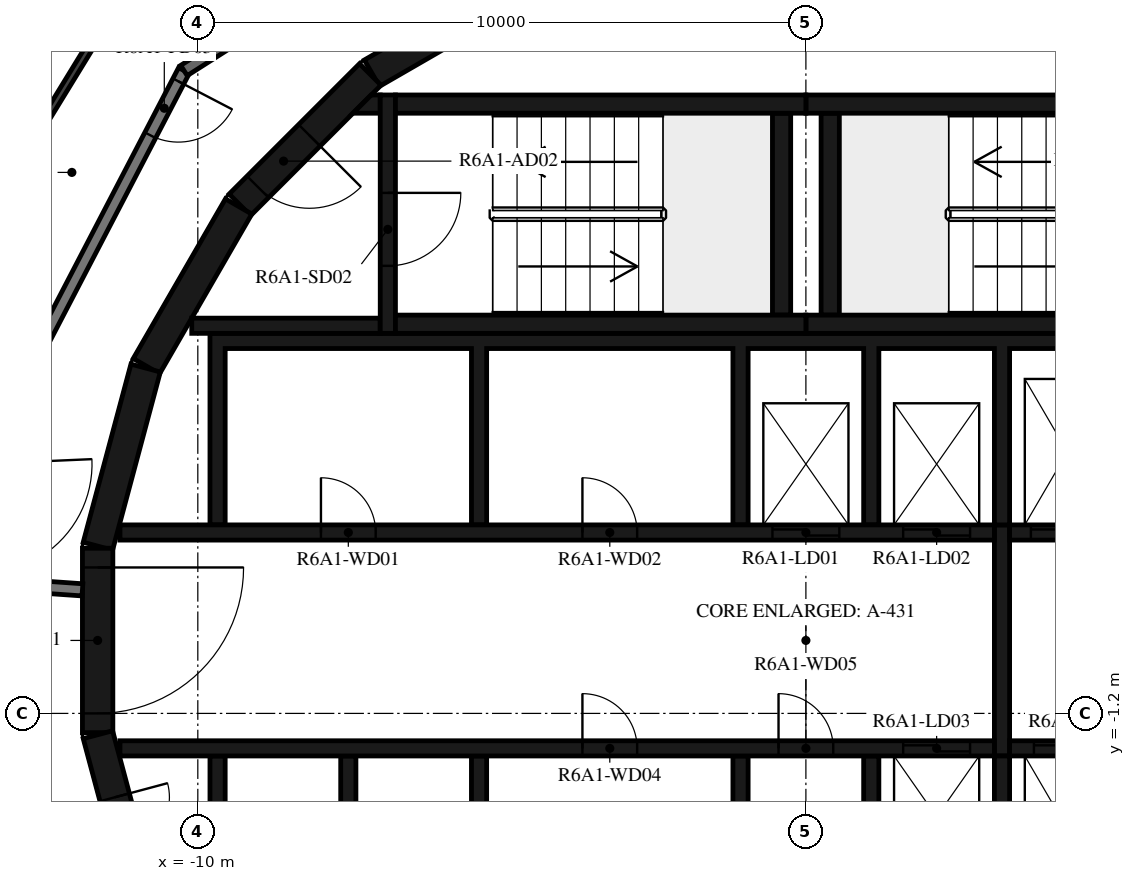
"""IFC4 building model, lengths in metres.
Left out: names, types, materials, properties, quantities, classifications, styles, units other than length and angle.
Written with IfcOpenShell. Run it as: python <this file> out.ifc"""

import sys

from ifc_helpers import new_model, si_unit, direction, frame, frame_2d, origin, place, context, subcontext, project, spatial, polyline, rectangle, outline, extrude, element, fill, save


model = new_model("IFC4")
c1 = context("Model", 3, precision=1e-05, world=origin(), true_north=direction((0.0, 1.0)))
c2 = subcontext(c1, "Body", "Model", "MODEL_VIEW")
j1 = project(units=[si_unit("LENGTHUNIT", "METRE"), si_unit("PLANEANGLEUNIT", "RADIAN")], contexts=[c1])
p1 = place(None, origin())
s1 = spatial("IfcSite", under=j1, at=p1, CompositionType="ELEMENT")
p2 = place(p1, origin())
s2 = spatial("IfcBuilding", under=s1, at=p2, CompositionType="ELEMENT")
p3 = place(p2, frame((0.0, 0.0, 230.2)))
s3 = spatial("IfcBuildingStorey", under=s2, at=p3, CompositionType="ELEMENT", Elevation=230.2)
p4 = place(p3, frame((-4.51, 10.845, 0.0), z_axis=(0.0, 0.0, 1.0), x_axis=(-0.865975092491, -0.500087131594, 0.0)))
e1 = element("IfcWall", 1, at=p4, inside=s3, PredefinedType="SHEAR", context=c2, shape_type="SweptSolid", body=[
    extrude(rectangle(XDim=3.033, YDim=0.5, at=frame_2d((1.516, 0.0))), origin(), (0.0, 0.0, 1.0), 3.12),
])
p5 = place(p3, frame((-7.164, 9.308, 0.0), z_axis=(0.0, 0.0, 1.0), x_axis=(-0.707106781187, -0.707106781187, 0.0)))
e2 = element("IfcWall", 2, at=p5, inside=s3, PredefinedType="SHEAR", context=c2, shape_type="SweptSolid", body=[
    extrude(rectangle(XDim=3.032, YDim=0.5, at=frame_2d((1.516, 0.0))), origin(), (0.0, 0.0, 1.0), 3.12),
])
p6 = place(p5, frame((1.416, 0.0, 0.0)))
e3 = element("IfcOpeningElement", 3, at=p6, cuts=e2, PredefinedType="OPENING", context=c2, shape_type="SweptSolid", body=[
    extrude(rectangle(XDim=1.2, YDim=2.1, at=frame_2d((0.6, 1.05))), frame((0.0, 0.26, 0.0), z_axis=(0.0, -1.0, 0.0), x_axis=(1.0, 0.0, 0.0)), (0.0, 0.0, 1.0), 0.52),
])
for number, where, z_axis, x_axis in (
    (4, (-9.329, 7.137, 0.0), (0.0, 0.0, 1.0), (-0.5, -0.866, 0.0)),
    (5, (-10.858, 4.479, 0.0), (0.0, 0.0, 1.0), (-0.259, -0.966, 0.0)),
):
    element("IfcWall", number, at=place(p3, frame(where, z_axis=z_axis, x_axis=x_axis)), inside=s3, PredefinedType="SHEAR", context=c2, shape_type="SweptSolid", body=[
        extrude(rectangle(XDim=3.033, YDim=0.5, at=frame_2d((1.516, 0.0))), origin(), (0.0, 0.0, 1.0), 3.12),
    ])
p7 = place(p3, frame((-11.647, 1.516, 0.0), z_axis=(0.0, 0.0, 1.0), x_axis=(0.0, -1.0, 0.0)))
e6 = element("IfcWall", 6, at=p7, inside=s3, PredefinedType="SHEAR", context=c2, shape_type="SweptSolid", body=[
    extrude(rectangle(XDim=3.033, YDim=0.5, at=frame_2d((1.516, 0.0))), origin(), (0.0, 0.0, 1.0), 3.12),
])
p8 = place(p7, frame((0.316, 0.0, 0.0)))
e7 = element("IfcOpeningElement", 7, at=p8, cuts=e6, PredefinedType="OPENING", context=c2, shape_type="SweptSolid", body=[
    extrude(rectangle(XDim=2.4, YDim=2.1, at=frame_2d((1.2, 1.05))), frame((0.0, 0.26, 0.0), z_axis=(0.0, -1.0, 0.0), x_axis=(1.0, 0.0, 0.0)), (0.0, 0.0, 1.0), 0.52),
])
p9 = place(p3, frame((-11.643, -1.55, 0.0), z_axis=(0.0, 0.0, 1.0), x_axis=(0.258734743916, -0.965948410781, 0.0)))
e8 = element("IfcWall", 8, at=p9, inside=s3, PredefinedType="SHEAR", context=c2, shape_type="SweptSolid", body=[
    extrude(rectangle(XDim=3.033, YDim=0.5, at=frame_2d((1.516, 0.0))), origin(), (0.0, 0.0, 1.0), 3.12),
])
p10 = place(p9, frame((1.066, 0.0, 0.0)))
e9 = element("IfcOpeningElement", 9, at=p10, cuts=e8, PredefinedType="OPENING", context=c2, shape_type="SweptSolid", body=[
    extrude(rectangle(XDim=0.9, YDim=2.1, at=frame_2d((0.45, 1.05))), frame((0.0, 0.26, 0.0), z_axis=(0.0, -1.0, 0.0), x_axis=(1.0, 0.0, 0.0)), (0.0, 0.0, 1.0), 0.52),
])
for number, where, z_axis, x_axis in (
    (10, (0.0, 5.2, 0.0), (0.0, 0.0, 1.0), (1.0, 0.0, 0.0)),
    (11, (0.0, 8.82, 0.0), (0.0, 0.0, 1.0), (1.0, 0.0, 0.0)),
):
    element("IfcWall", number, at=place(p3, frame(where, z_axis=z_axis, x_axis=x_axis)), inside=s3, PredefinedType="SHEAR", context=c2, shape_type="SweptSolid", body=[
        extrude(rectangle(XDim=6.75, YDim=0.3, at=frame_2d((3.375, 0.0))), origin(), (0.0, 0.0, 1.0), 3.12),
    ])
p11 = place(p3, frame((0.4, 5.35, 0.0), z_axis=(0.0, 0.0, 1.0), x_axis=(0.0, 1.0, 0.0)))
e12 = element("IfcWall", 12, at=p11, inside=s3, PredefinedType="SHEAR", context=c2, shape_type="SweptSolid", body=[
    extrude(rectangle(XDim=3.32, YDim=0.3, at=frame_2d((1.66, 0.0))), origin(), (0.0, 0.0, 1.0), 3.12),
])
for number, where, z_axis, x_axis in (
    (13, (-6.75, 5.2, 0.0), (0.0, 0.0, 1.0), (1.0, 0.0, 0.0)),
    (14, (-6.75, 8.82, 0.0), (0.0, 0.0, 1.0), (1.0, 0.0, 0.0)),
):
    element("IfcWall", number, at=place(p3, frame(where, z_axis=z_axis, x_axis=x_axis)), inside=s3, PredefinedType="SHEAR", context=c2, shape_type="SweptSolid", body=[
        extrude(rectangle(XDim=6.75, YDim=0.3, at=frame_2d((3.375, 0.0))), origin(), (0.0, 0.0, 1.0), 3.12),
    ])
p12 = place(p3, frame((-0.4, 5.35, 0.0), z_axis=(0.0, 0.0, 1.0), x_axis=(0.0, 1.0, 0.0)))
e15 = element("IfcWall", 15, at=p12, inside=s3, PredefinedType="SHEAR", context=c2, shape_type="SweptSolid", body=[
    extrude(rectangle(XDim=3.32, YDim=0.3, at=frame_2d((1.66, 0.0))), origin(), (0.0, 0.0, 1.0), 3.12),
])
p13 = place(p3, frame((-6.875, 8.97, 0.0), z_axis=(0.0, 0.0, 1.0), x_axis=(0.0, -1.0, 0.0)))
e16 = element("IfcWall", 16, at=p13, inside=s3, PredefinedType="SHEAR", context=c2, shape_type="SweptSolid", body=[
    extrude(rectangle(XDim=3.92, YDim=0.25, at=frame_2d((1.96, 0.0))), origin(), (0.0, 0.0, 1.0), 3.12),
])
p14 = place(p13, frame((1.61, 0.0, 0.0)))
e17 = element("IfcOpeningElement", 17, at=p14, cuts=e16, PredefinedType="OPENING", context=c2, shape_type="SweptSolid", body=[
    extrude(rectangle(XDim=1.2, YDim=2.1, at=frame_2d((0.6, 1.05))), frame((0.0, 0.135, 0.0), z_axis=(0.0, -1.0, 0.0), x_axis=(1.0, 0.0, 0.0)), (0.0, 0.0, 1.0), 0.27),
])
p15 = place(p3, frame((-7.0, 5.175, 0.0), z_axis=(0.0, 0.0, 1.0), x_axis=(-1.0, 0.0, 0.0)))
e18 = element("IfcWall", 18, at=p15, inside=s3, PredefinedType="SHEAR", context=c2, shape_type="SweptSolid", body=[
    extrude(rectangle(XDim=3.1, YDim=0.25, at=frame_2d((1.55, 0.0))), origin(), (0.0, 0.0, 1.0), 3.12),
])
p16 = place(p3, origin())
e19 = element("IfcWall", 19, at=p16, inside=s3, PredefinedType="SHEAR", context=c2, shape_type="SweptSolid", body=[
    extrude(outline(polyline([(-7.148, 8.97), (-7.0, 8.97), (-7.0, 8.67), (-7.448, 8.67), (-7.148, 8.97)])), origin(), (0.0, 0.0, 1.0), 3.12),
])
p17 = place(p3, origin())
e20 = element("IfcWall", 20, at=p17, inside=s3, PredefinedType="SHEAR", context=c2, shape_type="SweptSolid", body=[
    extrude(outline(polyline([(-9.55, 4.8), (-5.5, 4.8), (-5.5, 1.9), (-5.25, 1.9), (-5.25, 4.8), (-1.2, 4.8), (-1.2, 1.9), (-0.95, 1.9), (-0.95, 4.8), (0.95, 4.8), (0.95, 1.9), (1.2, 1.9), (1.2, 4.8), (3.1, 4.8), (3.1, 1.9), (3.35, 1.9), (3.35, 4.8), (5.25, 4.8), (5.25, 1.9), (5.5, 1.9), (5.5, 4.8), (7.4, 4.8), (7.4, 1.9), (7.65, 1.9), (7.65, 4.8), (9.55, 4.8), (9.55, 1.9), (9.8, 1.9), (9.8, 4.8), (9.8, 5.05), (-9.8, 5.05), (-9.8, 4.8), (-9.8, 1.9), (-9.55, 1.9), (-9.55, 4.8)])), origin(), (0.0, 0.0, 1.0), 3.12),
])
p18 = place(p3, origin())
e21 = element("IfcWall", 21, at=p18, inside=s3, PredefinedType="SHEAR", context=c2, shape_type="SweptSolid", body=[
    extrude(outline(polyline([(9.8, -5.05), (9.8, -4.8), (9.8, -1.9), (9.55, -1.9), (9.55, -4.8), (7.65, -4.8), (7.65, -1.9), (7.4, -1.9), (7.4, -4.8), (5.5, -4.8), (5.5, -1.9), (5.25, -1.9), (5.25, -4.8), (3.35, -4.8), (3.35, -1.9), (3.1, -1.9), (3.1, -4.8), (1.2, -4.8), (1.2, -1.9), (0.95, -1.9), (0.95, -4.8), (-0.95, -4.8), (-0.95, -1.9), (-1.2, -1.9), (-1.2, -4.8), (-5.25, -4.8), (-5.25, -1.9), (-5.5, -1.9), (-5.5, -4.8), (-7.4, -4.8), (-7.4, -1.9), (-7.65, -1.9), (-7.65, -4.8), (-9.55, -4.8), (-9.55, -1.9), (-9.8, -1.9), (-9.8, -4.8), (-9.8, -5.05), (9.8, -5.05)])), origin(), (0.0, 0.0, 1.0), 3.12),
])
p19 = place(p3, frame((-11.28, 1.775, 0.0), z_axis=(0.0, 0.0, 1.0), x_axis=(1.0, 0.0, 0.0)))
e22 = element("IfcWall", 22, at=p19, inside=s3, PredefinedType="SHEAR", context=c2, shape_type="SweptSolid", body=[
    extrude(rectangle(XDim=14.38, YDim=0.25, at=frame_2d((7.19, 0.0))), origin(), (0.0, 0.0, 1.0), 3.12),
])
p20 = place(p19, frame((10.73, 0.0, 0.0)))
e23 = element("IfcOpeningElement", 23, at=p20, cuts=e22, PredefinedType="OPENING", context=c2, shape_type="SweptSolid", body=[
    extrude(rectangle(XDim=1.1, YDim=2.1, at=frame_2d((0.55, 1.05))), frame((0.0, 0.135, 0.0), z_axis=(0.0, -1.0, 0.0), x_axis=(1.0, 0.0, 0.0)), (0.0, 0.0, 1.0), 0.27),
])
p21 = place(p19, frame((12.88, 0.0, 0.0)))
e24 = element("IfcOpeningElement", 24, at=p21, cuts=e22, PredefinedType="OPENING", context=c2, shape_type="SweptSolid", body=[
    extrude(rectangle(XDim=1.1, YDim=2.1, at=frame_2d((0.55, 1.05))), frame((0.0, 0.135, 0.0), z_axis=(0.0, -1.0, 0.0), x_axis=(1.0, 0.0, 0.0)), (0.0, 0.0, 1.0), 0.27),
])
p22 = place(p19, frame((3.305, 0.0, 0.0)))
e25 = element("IfcOpeningElement", 25, at=p22, cuts=e22, PredefinedType="OPENING", context=c2, shape_type="SweptSolid", body=[
    extrude(rectangle(XDim=0.9, YDim=2.1, at=frame_2d((0.45, 1.05))), frame((0.0, 0.135, 0.0), z_axis=(0.0, -1.0, 0.0), x_axis=(1.0, 0.0, 0.0)), (0.0, 0.0, 1.0), 0.27),
])
p23 = place(p19, frame((7.605, 0.0, 0.0)))
e26 = element("IfcOpeningElement", 26, at=p23, cuts=e22, PredefinedType="OPENING", context=c2, shape_type="SweptSolid", body=[
    extrude(rectangle(XDim=0.9, YDim=2.1, at=frame_2d((0.45, 1.05))), frame((0.0, 0.135, 0.0), z_axis=(0.0, -1.0, 0.0), x_axis=(1.0, 0.0, 0.0)), (0.0, 0.0, 1.0), 0.27),
])
p24 = place(p3, frame((3.35, 1.775, 0.0), z_axis=(0.0, 0.0, 1.0), x_axis=(1.0, 0.0, 0.0)))
e27 = element("IfcWall", 27, at=p24, inside=s3, PredefinedType="SHEAR", context=c2, shape_type="SweptSolid", body=[
    extrude(rectangle(XDim=7.93, YDim=0.25, at=frame_2d((3.965, 0.0))), origin(), (0.0, 0.0, 1.0), 3.12),
])
p25 = place(p24, frame((0.35, 0.0, 0.0)))
e28 = element("IfcOpeningElement", 28, at=p25, cuts=e27, PredefinedType="OPENING", context=c2, shape_type="SweptSolid", body=[
    extrude(rectangle(XDim=1.2, YDim=2.4, at=frame_2d((0.6, 1.2))), frame((0.0, 0.135, 0.0), z_axis=(0.0, -1.0, 0.0), x_axis=(1.0, 0.0, 0.0)), (0.0, 0.0, 1.0), 0.27),
])
p26 = place(p24, frame((2.5, 0.0, 0.0)))
e29 = element("IfcOpeningElement", 29, at=p26, cuts=e27, PredefinedType="OPENING", context=c2, shape_type="SweptSolid", body=[
    extrude(rectangle(XDim=1.2, YDim=2.4, at=frame_2d((0.6, 1.2))), frame((0.0, 0.135, 0.0), z_axis=(0.0, -1.0, 0.0), x_axis=(1.0, 0.0, 0.0)), (0.0, 0.0, 1.0), 0.27),
])
p27 = place(p24, frame((4.8, 0.0, 0.0)))
e30 = element("IfcOpeningElement", 30, at=p27, cuts=e27, PredefinedType="OPENING", context=c2, shape_type="SweptSolid", body=[
    extrude(rectangle(XDim=0.9, YDim=2.1, at=frame_2d((0.45, 1.05))), frame((0.0, 0.135, 0.0), z_axis=(0.0, -1.0, 0.0), x_axis=(1.0, 0.0, 0.0)), (0.0, 0.0, 1.0), 0.27),
])
p28 = place(p3, frame((-11.28, -1.775, 0.0), z_axis=(0.0, 0.0, 1.0), x_axis=(1.0, 0.0, 0.0)))
e31 = element("IfcWall", 31, at=p28, inside=s3, PredefinedType="SHEAR", context=c2, shape_type="SweptSolid", body=[
    extrude(rectangle(XDim=14.38, YDim=0.25, at=frame_2d((7.19, 0.0))), origin(), (0.0, 0.0, 1.0), 3.12),
])
p29 = place(p28, frame((12.88, 0.0, 0.0)))
e32 = element("IfcOpeningElement", 32, at=p29, cuts=e31, PredefinedType="OPENING", context=c2, shape_type="SweptSolid", body=[
    extrude(rectangle(XDim=1.1, YDim=2.1, at=frame_2d((0.55, 1.05))), frame((0.0, 0.135, 0.0), z_axis=(0.0, -1.0, 0.0), x_axis=(1.0, 0.0, 0.0)), (0.0, 0.0, 1.0), 0.27),
])
p30 = place(p28, frame((7.605, 0.0, 0.0)))
e33 = element("IfcOpeningElement", 33, at=p30, cuts=e31, PredefinedType="OPENING", context=c2, shape_type="SweptSolid", body=[
    extrude(rectangle(XDim=0.9, YDim=2.1, at=frame_2d((0.45, 1.05))), frame((0.0, 0.135, 0.0), z_axis=(0.0, -1.0, 0.0), x_axis=(1.0, 0.0, 0.0)), (0.0, 0.0, 1.0), 0.27),
])
p31 = place(p28, frame((10.83, 0.0, 0.0)))
e34 = element("IfcOpeningElement", 34, at=p31, cuts=e31, PredefinedType="OPENING", context=c2, shape_type="SweptSolid", body=[
    extrude(rectangle(XDim=0.9, YDim=2.1, at=frame_2d((0.45, 1.05))), frame((0.0, 0.135, 0.0), z_axis=(0.0, -1.0, 0.0), x_axis=(1.0, 0.0, 0.0)), (0.0, 0.0, 1.0), 0.27),
])
p32 = place(p3, frame((3.35, -1.775, 0.0), z_axis=(0.0, 0.0, 1.0), x_axis=(1.0, 0.0, 0.0)))
e35 = element("IfcWall", 35, at=p32, inside=s3, PredefinedType="SHEAR", context=c2, shape_type="SweptSolid", body=[
    extrude(rectangle(XDim=7.93, YDim=0.25, at=frame_2d((3.965, 0.0))), origin(), (0.0, 0.0, 1.0), 3.12),
])
p33 = place(p32, frame((0.4, 0.0, 0.0)))
e36 = element("IfcOpeningElement", 36, at=p33, cuts=e35, PredefinedType="OPENING", context=c2, shape_type="SweptSolid", body=[
    extrude(rectangle(XDim=1.1, YDim=2.4, at=frame_2d((0.55, 1.2))), frame((0.0, 0.135, 0.0), z_axis=(0.0, -1.0, 0.0), x_axis=(1.0, 0.0, 0.0)), (0.0, 0.0, 1.0), 0.27),
])
p34 = place(p32, frame((2.55, 0.0, 0.0)))
e37 = element("IfcOpeningElement", 37, at=p34, cuts=e35, PredefinedType="OPENING", context=c2, shape_type="SweptSolid", body=[
    extrude(rectangle(XDim=1.1, YDim=2.4, at=frame_2d((0.55, 1.2))), frame((0.0, 0.135, 0.0), z_axis=(0.0, -1.0, 0.0), x_axis=(1.0, 0.0, 0.0)), (0.0, 0.0, 1.0), 0.27),
])
p35 = place(p32, frame((4.7, 0.0, 0.0)))
e38 = element("IfcOpeningElement", 38, at=p35, cuts=e35, PredefinedType="OPENING", context=c2, shape_type="SweptSolid", body=[
    extrude(rectangle(XDim=1.1, YDim=2.4, at=frame_2d((0.55, 1.2))), frame((0.0, 0.135, 0.0), z_axis=(0.0, -1.0, 0.0), x_axis=(1.0, 0.0, 0.0)), (0.0, 0.0, 1.0), 0.27),
])
p36 = place(p3, frame((3.225, -1.9, 0.0), z_axis=(0.0, 0.0, 1.0), x_axis=(0.0, 1.0, 0.0)))
e39 = element("IfcWall", 39, at=p36, inside=s3, PredefinedType="SHEAR", context=c2, shape_type="SweptSolid", body=[
    extrude(rectangle(XDim=3.8, YDim=0.25, at=frame_2d((1.9, 0.0))), origin(), (0.0, 0.0, 1.0), 3.12),
])
p37 = place(p3, frame((-10.228, 9.372, 0.0), z_axis=(0.0, 0.0, 1.0), x_axis=(-0.461759464021, -0.887005184532, 0.0)))
e40 = element("IfcWall", 40, at=p37, inside=s3, PredefinedType="STANDARD", context=c2, shape_type="SweptSolid", body=[
    extrude(rectangle(XDim=7.181, YDim=0.2, at=frame_2d((3.591, 0.0))), origin(), (0.0, 0.0, 1.0), 3.12),
])
p38 = place(p37, frame((0.2, 0.0, 0.0)))
e41 = element("IfcOpeningElement", 41, at=p38, cuts=e40, PredefinedType="OPENING", context=c2, shape_type="SweptSolid", body=[
    extrude(rectangle(XDim=1.0, YDim=2.1, at=frame_2d((0.5, 1.05))), frame((0.0, 0.11, 0.0), z_axis=(0.0, -1.0, 0.0), x_axis=(1.0, 0.0, 0.0)), (0.0, 0.0, 1.0), 0.22),
])
p39 = place(p3, frame((-13.454, 0.941, 0.0), z_axis=(0.0, 0.0, 1.0), x_axis=(0.99755155062, -0.069934997354, 0.0)))
e42 = element("IfcWall", 42, at=p39, inside=s3, PredefinedType="STANDARD", context=c2, shape_type="SweptSolid", body=[
    extrude(rectangle(XDim=1.561, YDim=0.2, at=frame_2d((0.78, 0.0))), origin(), (0.0, 0.0, 1.0), 3.12),
])
p40 = place(p3, frame((-4.172, 13.231, 0.0), z_axis=(0.0, 0.0, 1.0), x_axis=(-0.843388394728, -0.537304397561, 0.0)))
e43 = element("IfcWall", 43, at=p40, inside=s3, PredefinedType="STANDARD", context=c2, shape_type="SweptSolid", body=[
    extrude(rectangle(XDim=7.181, YDim=0.2, at=frame_2d((3.59, 0.0))), origin(), (0.0, 0.0, 1.0), 3.12),
])
p41 = place(p3, frame((-11.373, 10.421, 0.0), z_axis=(0.0, 0.0, 1.0), x_axis=(-0.522435957358, -0.852678527031, 0.0)))
e44 = element("IfcWall", 44, at=p41, inside=s3, PredefinedType="PARTITIONING", context=c2, shape_type="SweptSolid", body=[
    extrude(rectangle(XDim=5.267, YDim=0.12, at=frame_2d((2.633, 0.0))), origin(), (0.0, 0.0, 1.0), 3.12),
])
p42 = place(p14, origin())
e45 = element("IfcDoor", 45, at=p42, inside=s3, OperationType="SINGLE_SWING_LEFT", PredefinedType="DOOR", context=c2, shape_type="SweptSolid", body=[
    extrude(rectangle(XDim=1.2, YDim=2.1, at=frame_2d((0.6, 1.05))), frame((0.0, 0.025, 0.0), z_axis=(0.0, -1.0, 0.0), x_axis=(1.0, 0.0, 0.0)), (0.0, 0.0, 1.0), 0.05),
])
fill(e17, e45)
p43 = place(p6, origin())
e46 = element("IfcDoor", 46, at=p43, inside=s3, OperationType="SINGLE_SWING_RIGHT", PredefinedType="DOOR", context=c2, shape_type="SweptSolid", body=[
    extrude(rectangle(XDim=1.2, YDim=2.1, at=frame_2d((0.6, 1.05))), frame((0.0, 0.025, 0.0), z_axis=(0.0, -1.0, 0.0), x_axis=(1.0, 0.0, 0.0)), (0.0, 0.0, 1.0), 0.05),
])
fill(e3, e46)
p44 = place(p8, origin())
e47 = element("IfcDoor", 47, at=p44, inside=s3, OperationType="DOUBLE_DOOR_SINGLE_SWING", PredefinedType="DOOR", context=c2, shape_type="SweptSolid", body=[
    extrude(rectangle(XDim=2.4, YDim=2.1, at=frame_2d((1.2, 1.05))), frame((0.0, 0.025, 0.0), z_axis=(0.0, -1.0, 0.0), x_axis=(1.0, 0.0, 0.0)), (0.0, 0.0, 1.0), 0.05),
])
fill(e7, e47)
p45 = place(p20, origin())
e48 = element("IfcDoor", 48, at=p45, inside=s3, OperationType="DOUBLE_DOOR_SLIDING", PredefinedType="DOOR", context=c2, shape_type="SweptSolid", body=[
    extrude(rectangle(XDim=1.1, YDim=2.1, at=frame_2d((0.55, 1.05))), frame((0.0, 0.025, 0.0), z_axis=(0.0, -1.0, 0.0), x_axis=(1.0, 0.0, 0.0)), (0.0, 0.0, 1.0), 0.05),
])
fill(e23, e48)
p46 = place(p21, origin())
e49 = element("IfcDoor", 49, at=p46, inside=s3, OperationType="DOUBLE_DOOR_SLIDING", PredefinedType="DOOR", context=c2, shape_type="SweptSolid", body=[
    extrude(rectangle(XDim=1.1, YDim=2.1, at=frame_2d((0.55, 1.05))), frame((0.0, 0.025, 0.0), z_axis=(0.0, -1.0, 0.0), x_axis=(1.0, 0.0, 0.0)), (0.0, 0.0, 1.0), 0.05),
])
fill(e24, e49)
p47 = place(p25, origin())
e50 = element("IfcDoor", 50, at=p47, inside=s3, OperationType="DOUBLE_DOOR_SLIDING", PredefinedType="DOOR", context=c2, shape_type="SweptSolid", body=[
    extrude(rectangle(XDim=1.2, YDim=2.4, at=frame_2d((0.6, 1.2))), frame((0.0, 0.025, 0.0), z_axis=(0.0, -1.0, 0.0), x_axis=(1.0, 0.0, 0.0)), (0.0, 0.0, 1.0), 0.05),
])
fill(e28, e50)
p48 = place(p29, origin())
e51 = element("IfcDoor", 51, at=p48, inside=s3, OperationType="DOUBLE_DOOR_SLIDING", PredefinedType="DOOR", context=c2, shape_type="SweptSolid", body=[
    extrude(rectangle(XDim=1.1, YDim=2.1, at=frame_2d((0.55, 1.05))), frame((0.0, 0.025, 0.0), z_axis=(0.0, -1.0, 0.0), x_axis=(1.0, 0.0, 0.0)), (0.0, 0.0, 1.0), 0.05),
])
fill(e32, e51)
p49 = place(p33, origin())
e52 = element("IfcDoor", 52, at=p49, inside=s3, OperationType="DOUBLE_DOOR_SLIDING", PredefinedType="DOOR", context=c2, shape_type="SweptSolid", body=[
    extrude(rectangle(XDim=1.1, YDim=2.4, at=frame_2d((0.55, 1.2))), frame((0.0, 0.025, 0.0), z_axis=(0.0, -1.0, 0.0), x_axis=(1.0, 0.0, 0.0)), (0.0, 0.0, 1.0), 0.05),
])
fill(e36, e52)
p50 = place(p22, origin())
e53 = element("IfcDoor", 53, at=p50, inside=s3, OperationType="SINGLE_SWING_LEFT", PredefinedType="DOOR", context=c2, shape_type="SweptSolid", body=[
    extrude(rectangle(XDim=0.9, YDim=2.1, at=frame_2d((0.45, 1.05))), frame((0.0, 0.025, 0.0), z_axis=(0.0, -1.0, 0.0), x_axis=(1.0, 0.0, 0.0)), (0.0, 0.0, 1.0), 0.05),
])
fill(e25, e53)
p51 = place(p23, origin())
e54 = element("IfcDoor", 54, at=p51, inside=s3, OperationType="SINGLE_SWING_RIGHT", PredefinedType="DOOR", context=c2, shape_type="SweptSolid", body=[
    extrude(rectangle(XDim=0.9, YDim=2.1, at=frame_2d((0.45, 1.05))), frame((0.0, 0.025, 0.0), z_axis=(0.0, -1.0, 0.0), x_axis=(1.0, 0.0, 0.0)), (0.0, 0.0, 1.0), 0.05),
])
fill(e26, e54)
p52 = place(p30, origin())
e55 = element("IfcDoor", 55, at=p52, inside=s3, OperationType="SINGLE_SWING_RIGHT", PredefinedType="DOOR", context=c2, shape_type="SweptSolid", body=[
    extrude(rectangle(XDim=0.9, YDim=2.1, at=frame_2d((0.45, 1.05))), frame((0.0, 0.025, 0.0), z_axis=(0.0, -1.0, 0.0), x_axis=(1.0, 0.0, 0.0)), (0.0, 0.0, 1.0), 0.05),
])
fill(e33, e55)
p53 = place(p31, origin())
e56 = element("IfcDoor", 56, at=p53, inside=s3, OperationType="SINGLE_SWING_LEFT", PredefinedType="DOOR", context=c2, shape_type="SweptSolid", body=[
    extrude(rectangle(XDim=0.9, YDim=2.1, at=frame_2d((0.45, 1.05))), frame((0.0, 0.025, 0.0), z_axis=(0.0, -1.0, 0.0), x_axis=(1.0, 0.0, 0.0)), (0.0, 0.0, 1.0), 0.05),
])
fill(e34, e56)
p54 = place(p10, origin())
e57 = element("IfcDoor", 57, at=p54, inside=s3, OperationType="SINGLE_SWING_RIGHT", PredefinedType="DOOR", context=c2, shape_type="SweptSolid", body=[
    extrude(rectangle(XDim=0.9, YDim=2.1, at=frame_2d((0.45, 1.05))), frame((0.0, 0.025, 0.0), z_axis=(0.0, -1.0, 0.0), x_axis=(1.0, 0.0, 0.0)), (0.0, 0.0, 1.0), 0.05),
])
fill(e9, e57)
p55 = place(p38, origin())
e58 = element("IfcDoor", 58, at=p55, inside=s3, OperationType="SINGLE_SWING_LEFT", PredefinedType="DOOR", context=c2, shape_type="SweptSolid", body=[
    extrude(rectangle(XDim=1.0, YDim=2.1, at=frame_2d((0.5, 1.05))), frame((0.0, 0.025, 0.0), z_axis=(0.0, -1.0, 0.0), x_axis=(1.0, 0.0, 0.0)), (0.0, 0.0, 1.0), 0.05),
])
fill(e41, e58)
save(model, sys.argv[1])
